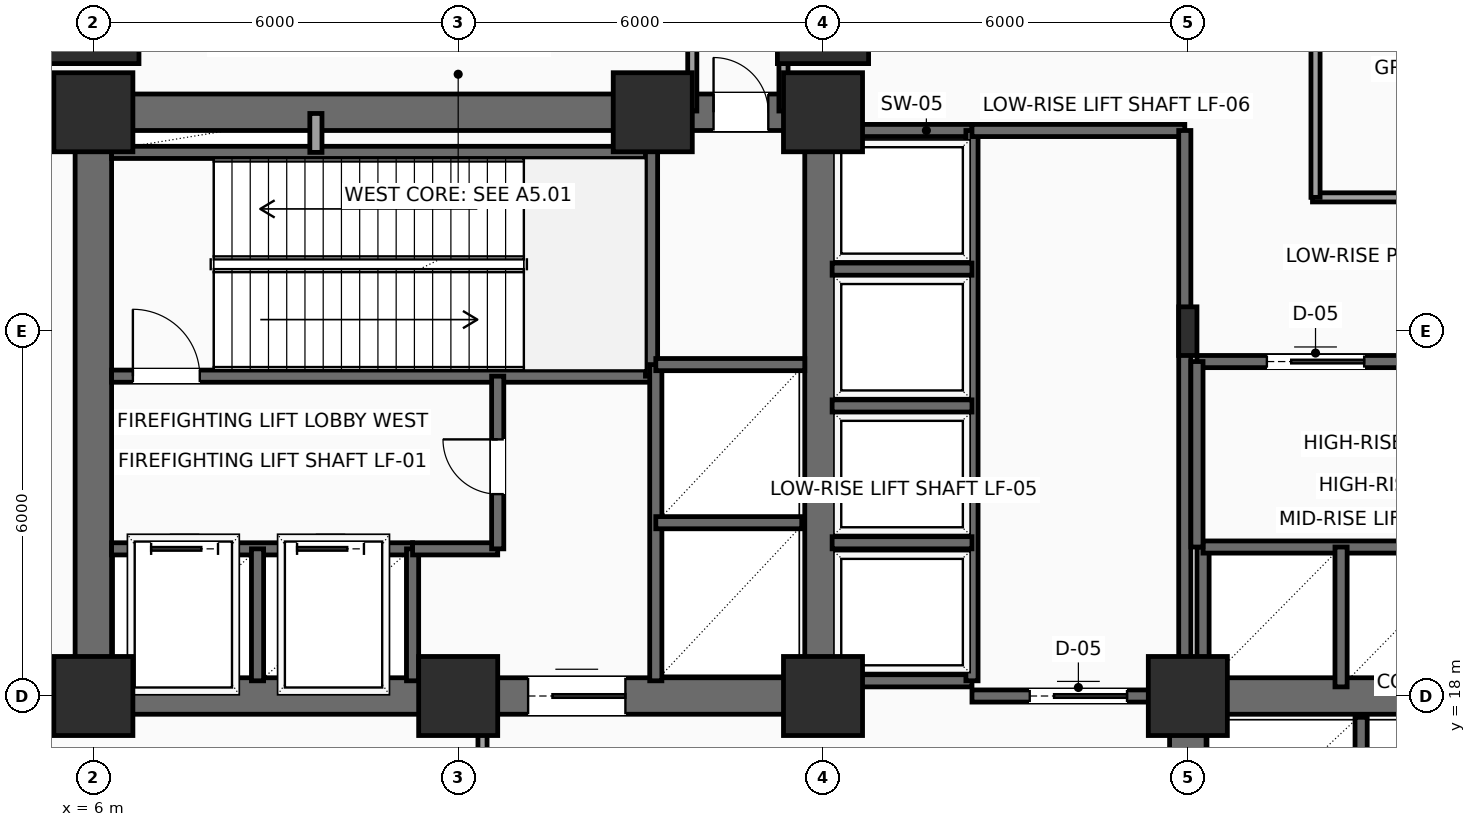
"""IFC4 building model, lengths in metres.
Left out: names, types, materials, properties, quantities, classifications, styles, units other than length and angle.
Written with IfcOpenShell. Run it as: python <this file> out.ifc"""

import sys

from ifc_helpers import new_model, si_unit, direction, frame, frame_2d, origin, origin_2d, place, context, subcontext, project, spatial, rectangle, i_section, extrude, element, fill, save


model = new_model("IFC4")
c1 = context("Model", 3, precision=1e-05, world=origin(), true_north=direction((0.0, 1.0)))
c2 = subcontext(c1, "Body", "Model", "MODEL_VIEW")
j1 = project(units=[si_unit("LENGTHUNIT", "METRE"), si_unit("PLANEANGLEUNIT", "RADIAN")], contexts=[c1])
p1 = place(None, origin())
s1 = spatial("IfcSite", under=j1, at=p1, CompositionType="ELEMENT")
p2 = place(p1, origin())
s2 = spatial("IfcBuilding", under=s1, at=p2, CompositionType="ELEMENT")
p3 = place(p2, frame((0.0, 0.0, 5.7)))
s3 = spatial("IfcBuildingStorey", under=s2, at=p3, CompositionType="ELEMENT", Elevation=5.7)
for number, where, z_axis, x_axis in (
    (1, (6.0, 18.0, 0.0), (0.0, 0.0, 1.0), (1.0, 0.0, 0.0)),
    (2, (12.0, 18.0, 0.0), (0.0, 0.0, 1.0), (1.0, 0.0, 0.0)),
    (3, (18.0, 18.0, 0.0), (0.0, 0.0, 1.0), (1.0, 0.0, 0.0)),
    (4, (6.0, 27.6, 0.0), (0.0, 0.0, 1.0), (1.0, 0.0, 0.0)),
    (5, (15.2, 27.6, 0.0), (0.0, 0.0, 1.0), (1.0, 0.0, 0.0)),
    (6, (18.0, 27.6, 0.0), (0.0, 0.0, 1.0), (1.0, 0.0, 0.0)),
    (7, (24.0, 18.0, 0.0), (0.0, 0.0, 1.0), (1.0, 0.0, 0.0)),
):
    element("IfcColumn", number, at=place(p3, frame(where, z_axis=z_axis, x_axis=x_axis)), inside=s3, PredefinedType="COLUMN", context=c2, shape_type="SweptSolid", body=[
        extrude(rectangle(XDim=1.3, YDim=1.3, at=origin_2d()), origin(), (0.0, 0.0, 1.0), 5.4),
    ])
for number, where, z_axis, x_axis in (
    (8, (6.0, 29.15, 0.0), (0.0, 0.0, 1.0), (1.0, 0.0, 0.0)),
    (9, (18.0, 29.15, 0.0), (0.0, 0.0, 1.0), (1.0, 0.0, 0.0)),
):
    element("IfcColumn", number, at=place(p3, frame(where, z_axis=z_axis, x_axis=x_axis)), inside=s3, PredefinedType="COLUMN", context=c2, shape_type="SweptSolid", body=[
        extrude(rectangle(XDim=1.5, YDim=1.5, at=origin_2d()), origin(), (0.0, 0.0, 1.0), 5.4),
    ])
p4 = place(p3, frame((24.0, 24.0, 0.0), z_axis=(0.0, 0.0, 1.0), x_axis=(1.0, 0.0, 0.0)))
e10 = element("IfcColumn", 10, at=p4, inside=s3, PredefinedType="COLUMN", context=c2, shape_type="SweptSolid", body=[
    extrude(i_section(OverallWidth=0.3, OverallDepth=0.8, WebThickness=0.018, FlangeThickness=0.033, FilletRadius=0.03, at=origin_2d()), origin(), (0.0, 0.0, 1.0), 5.4),
])
p5 = place(p3, frame((6.0, 18.0, 0.0), z_axis=(0.0, 0.0, 1.0), x_axis=(1.0, 0.0, 0.0)))
e11 = element("IfcWall", 11, at=p5, inside=s3, PredefinedType="SHEAR", context=c2, shape_type="SweptSolid", body=[
    extrude(rectangle(XDim=12.0, YDim=0.6, at=frame_2d((6.0, 0.0))), origin(), (0.0, 0.0, 1.0), 5.125),
])
p6 = place(p5, frame((7.15, 0.0, 0.0)))
e12 = element("IfcOpeningElement", 12, at=p6, cuts=e11, PredefinedType="OPENING", context=c2, shape_type="SweptSolid", body=[
    extrude(rectangle(XDim=1.6, YDim=2.3, at=frame_2d((0.8, 1.15))), frame((0.0, 0.31, 0.0), z_axis=(0.0, -1.0, 0.0), x_axis=(1.0, 0.0, 0.0)), (0.0, 0.0, 1.0), 0.62),
])
p7 = place(p3, frame((6.0, 27.6, 0.0), z_axis=(0.0, 0.0, 1.0), x_axis=(1.0, 0.0, 0.0)))
e13 = element("IfcWall", 13, at=p7, inside=s3, PredefinedType="SHEAR", context=c2, shape_type="SweptSolid", body=[
    extrude(rectangle(XDim=12.0, YDim=0.6, at=frame_2d((6.0, 0.0))), origin(), (0.0, 0.0, 1.0), 5.125),
])
p8 = place(p7, frame((10.2, 0.0, 0.0)))
e14 = element("IfcOpeningElement", 14, at=p8, cuts=e13, PredefinedType="OPENING", context=c2, shape_type="SweptSolid", body=[
    extrude(rectangle(XDim=0.9, YDim=2.15, at=frame_2d((0.45, 1.075))), frame((0.0, 0.31, 0.0), z_axis=(0.0, -1.0, 0.0), x_axis=(1.0, 0.0, 0.0)), (0.0, 0.0, 1.0), 0.62),
])
for number, where, z_axis, x_axis in (
    (15, (6.0, 18.0, 0.0), (0.0, 0.0, 1.0), (0.0, 1.0, 0.0)),
    (16, (18.0, 18.0, 0.0), (0.0, 0.0, 1.0), (0.0, 1.0, 0.0)),
    (17, (24.0, 18.0, 0.0), (0.0, 0.0, 1.0), (1.0, 0.0, 0.0)),
):
    element("IfcWall", number, at=place(p3, frame(where, z_axis=z_axis, x_axis=x_axis)), inside=s3, PredefinedType="SHEAR", context=c2, shape_type="SweptSolid", body=[
        extrude(rectangle(XDim=9.6, YDim=0.6, at=frame_2d((4.8, 0.0))), origin(), (0.0, 0.0, 1.0), 5.125),
    ])
p9 = place(p3, frame((24.0, 6.0, 0.0), z_axis=(0.0, 0.0, 1.0), x_axis=(0.0, 1.0, 0.0)))
e18 = element("IfcWall", 18, at=p9, inside=s3, PredefinedType="SHEAR", context=c2, shape_type="SweptSolid", body=[
    extrude(rectangle(XDim=12.0, YDim=0.6, at=frame_2d((6.0, 0.0))), origin(), (0.0, 0.0, 1.0), 5.125),
])
p10 = place(p9, frame((7.15, 0.0, 0.0)))
e19 = element("IfcOpeningElement", 19, at=p10, cuts=e18, PredefinedType="OPENING", context=c2, shape_type="SweptSolid", body=[
    extrude(rectangle(XDim=1.6, YDim=2.3, at=frame_2d((0.8, 1.15))), frame((0.0, 0.31, 0.0), z_axis=(0.0, -1.0, 0.0), x_axis=(1.0, 0.0, 0.0)), (0.0, 0.0, 1.0), 0.62),
])
p11 = place(p3, frame((6.3, 23.26, 0.0), z_axis=(0.0, 0.0, 1.0), x_axis=(1.0, 0.0, 0.0)))
e20 = element("IfcWall", 20, at=p11, inside=s3, PredefinedType="SHEAR", context=c2, shape_type="SweptSolid", body=[
    extrude(rectangle(XDim=8.88, YDim=0.2, at=frame_2d((4.44, 0.0))), origin(), (0.0, 0.0, 1.0), 5.125),
])
p12 = place(p11, frame((0.35, 0.0, 0.0)))
e21 = element("IfcOpeningElement", 21, at=p12, cuts=e20, PredefinedType="OPENING", context=c2, shape_type="SweptSolid", body=[
    extrude(rectangle(XDim=1.1, YDim=2.2, at=frame_2d((0.55, 1.1))), frame((0.0, 0.11, 0.0), z_axis=(0.0, -1.0, 0.0), x_axis=(1.0, 0.0, 0.0)), (0.0, 0.0, 1.0), 0.22),
])
p13 = place(p3, frame((6.3, 26.94, 0.0), z_axis=(0.0, 0.0, 1.0), x_axis=(1.0, 0.0, 0.0)))
e22 = element("IfcWall", 22, at=p13, inside=s3, PredefinedType="SHEAR", context=c2, shape_type="SweptSolid", body=[
    extrude(rectangle(XDim=8.88, YDim=0.2, at=frame_2d((4.44, 0.0))), origin(), (0.0, 0.0, 1.0), 5.125),
])
p14 = place(p3, frame((15.18, 23.26, 0.0), z_axis=(0.0, 0.0, 1.0), x_axis=(0.0, 1.0, 0.0)))
e23 = element("IfcWall", 23, at=p14, inside=s3, PredefinedType="SHEAR", context=c2, shape_type="SweptSolid", body=[
    extrude(rectangle(XDim=4.04, YDim=0.2, at=frame_2d((2.02, 0.0))), origin(), (0.0, 0.0, 1.0), 5.125),
])
p15 = place(p3, frame((6.3, 20.42, 0.0), z_axis=(0.0, 0.0, 1.0), x_axis=(1.0, 0.0, 0.0)))
e24 = element("IfcWall", 24, at=p15, inside=s3, PredefinedType="SHEAR", context=c2, shape_type="SweptSolid", body=[
    extrude(rectangle(XDim=4.95, YDim=0.2, at=frame_2d((2.475, 0.0))), origin(), (0.0, 0.0, 1.0), 5.125),
])
p16 = place(p15, frame((0.65, 0.0, 0.0)))
e25 = element("IfcOpeningElement", 25, at=p16, cuts=e24, PredefinedType="OPENING", context=c2, shape_type="SweptSolid", body=[
    extrude(rectangle(XDim=1.1, YDim=2.2, at=frame_2d((0.55, 1.1))), frame((0.0, 0.11, 0.0), z_axis=(0.0, -1.0, 0.0), x_axis=(1.0, 0.0, 0.0)), (0.0, 0.0, 1.0), 0.22),
])
p17 = place(p15, frame((3.05, 0.0, 0.0)))
e26 = element("IfcOpeningElement", 26, at=p17, cuts=e24, PredefinedType="OPENING", context=c2, shape_type="SweptSolid", body=[
    extrude(rectangle(XDim=1.1, YDim=2.2, at=frame_2d((0.55, 1.1))), frame((0.0, 0.11, 0.0), z_axis=(0.0, -1.0, 0.0), x_axis=(1.0, 0.0, 0.0)), (0.0, 0.0, 1.0), 0.22),
])
for number, where, z_axis, x_axis in (
    (27, (8.7, 18.25, 0.0), (0.0, 0.0, 1.0), (0.0, 1.0, 0.0)),
    (28, (11.25, 18.25, 0.0), (0.0, 0.0, 1.0), (0.0, 1.0, 0.0)),
):
    element("IfcWall", number, at=place(p3, frame(where, z_axis=z_axis, x_axis=x_axis)), inside=s3, PredefinedType="SHEAR", context=c2, shape_type="SweptSolid", body=[
        extrude(rectangle(XDim=2.17, YDim=0.2, at=frame_2d((1.085, 0.0))), origin(), (0.0, 0.0, 1.0), 5.125),
    ])
p18 = place(p3, frame((11.25, 20.42, 0.0), z_axis=(0.0, 0.0, 1.0), x_axis=(1.0, 0.0, 0.0)))
e29 = element("IfcWall", 29, at=p18, inside=s3, PredefinedType="SHEAR", context=c2, shape_type="SweptSolid", body=[
    extrude(rectangle(XDim=1.4, YDim=0.2, at=frame_2d((0.7, 0.0))), origin(), (0.0, 0.0, 1.0), 5.125),
])
p19 = place(p3, frame((12.65, 20.42, 0.0), z_axis=(0.0, 0.0, 1.0), x_axis=(0.0, 1.0, 0.0)))
e30 = element("IfcWall", 30, at=p19, inside=s3, PredefinedType="SHEAR", context=c2, shape_type="SweptSolid", body=[
    extrude(rectangle(XDim=2.84, YDim=0.2, at=frame_2d((1.42, 0.0))), origin(), (0.0, 0.0, 1.0), 5.125),
])
p20 = place(p19, frame((0.9, 0.0, 0.0)))
e31 = element("IfcOpeningElement", 31, at=p20, cuts=e30, PredefinedType="OPENING", context=c2, shape_type="SweptSolid", body=[
    extrude(rectangle(XDim=0.9, YDim=2.15, at=frame_2d((0.45, 1.075))), frame((0.0, 0.11, 0.0), z_axis=(0.0, -1.0, 0.0), x_axis=(1.0, 0.0, 0.0)), (0.0, 0.0, 1.0), 0.22),
])
p21 = place(p3, frame((9.66, 26.94, 0.0), z_axis=(0.0, 0.0, 1.0), x_axis=(0.0, 1.0, 0.0)))
e32 = element("IfcWall", 32, at=p21, inside=s3, PredefinedType="SOLIDWALL", context=c2, shape_type="SweptSolid", body=[
    extrude(rectangle(XDim=0.64, YDim=0.2, at=frame_2d((0.32, 0.0))), origin(), (0.0, 0.0, 1.0), 5.125),
])
p22 = place(p3, frame((15.25, 18.25, 0.0), z_axis=(0.0, 0.0, 1.0), x_axis=(0.0, 1.0, 0.0)))
e33 = element("IfcWall", 33, at=p22, inside=s3, PredefinedType="SHEAR", context=c2, shape_type="SweptSolid", body=[
    extrude(rectangle(XDim=5.2, YDim=0.2, at=frame_2d((2.6, 0.0))), origin(), (0.0, 0.0, 1.0), 5.125),
])
p23 = place(p3, frame((15.25, 20.85, 0.0), z_axis=(0.0, 0.0, 1.0), x_axis=(1.0, 0.0, 0.0)))
e34 = element("IfcWall", 34, at=p23, inside=s3, PredefinedType="SHEAR", context=c2, shape_type="SweptSolid", body=[
    extrude(rectangle(XDim=2.4, YDim=0.2, at=frame_2d((1.2, 0.0))), origin(), (0.0, 0.0, 1.0), 5.125),
])
p24 = place(p3, frame((15.25, 23.45, 0.0), z_axis=(0.0, 0.0, 1.0), x_axis=(1.0, 0.0, 0.0)))
e35 = element("IfcWall", 35, at=p24, inside=s3, PredefinedType="SHEAR", context=c2, shape_type="SweptSolid", body=[
    extrude(rectangle(XDim=2.45, YDim=0.2, at=frame_2d((1.225, 0.0))), origin(), (0.0, 0.0, 1.0), 5.125),
])
p25 = place(p3, frame((26.85, 15.25, 0.0), z_axis=(0.0, 0.0, 1.0), x_axis=(0.0, 1.0, 0.0)))
e36 = element("IfcWall", 36, at=p25, inside=s3, PredefinedType="SHEAR", context=c2, shape_type="SweptSolid", body=[
    extrude(rectangle(XDim=2.4, YDim=0.2, at=frame_2d((1.2, 0.0))), origin(), (0.0, 0.0, 1.0), 5.125),
])
for number, where, z_axis, x_axis in (
    (37, (18.1, 27.3, 0.0), (0.0, 0.0, 1.0), (1.0, 0.0, 0.0)),
    (38, (18.1, 18.25, 0.0), (0.0, 0.0, 1.0), (1.0, 0.0, 0.0)),
):
    element("IfcWall", number, at=place(p3, frame(where, z_axis=z_axis, x_axis=x_axis)), inside=s3, PredefinedType="SHEAR", context=c2, shape_type="SweptSolid", body=[
        extrude(rectangle(XDim=2.35, YDim=0.2, at=frame_2d((1.175, 0.0))), origin(), (0.0, 0.0, 1.0), 5.125),
    ])
p26 = place(p3, frame((20.45, 18.25, 0.0), z_axis=(0.0, 0.0, 1.0), x_axis=(0.0, 1.0, 0.0)))
e39 = element("IfcWall", 39, at=p26, inside=s3, PredefinedType="SHEAR", context=c2, shape_type="SweptSolid", body=[
    extrude(rectangle(XDim=9.05, YDim=0.2, at=frame_2d((4.525, 0.0))), origin(), (0.0, 0.0, 1.0), 5.125),
])
for number, where, z_axis, x_axis in (
    (40, (18.15, 20.52, 0.0), (0.0, 0.0, 1.0), (1.0, 0.0, 0.0)),
    (41, (18.15, 22.77, 0.0), (0.0, 0.0, 1.0), (1.0, 0.0, 0.0)),
    (42, (18.15, 25.02, 0.0), (0.0, 0.0, 1.0), (1.0, 0.0, 0.0)),
):
    element("IfcWall", number, at=place(p3, frame(where, z_axis=z_axis, x_axis=x_axis)), inside=s3, PredefinedType="SHEAR", context=c2, shape_type="SweptSolid", body=[
        extrude(rectangle(XDim=2.3, YDim=0.2, at=frame_2d((1.15, 0.0))), origin(), (0.0, 0.0, 1.0), 5.125),
    ])
p27 = place(p3, frame((20.45, 18.0, 0.0), z_axis=(0.0, 0.0, 1.0), x_axis=(1.0, 0.0, 0.0)))
e43 = element("IfcWall", 43, at=p27, inside=s3, PredefinedType="SHEAR", context=c2, shape_type="SweptSolid", body=[
    extrude(rectangle(XDim=3.5, YDim=0.2, at=frame_2d((1.75, 0.0))), origin(), (0.0, 0.0, 1.0), 5.125),
])
p28 = place(p27, frame((0.95, 0.0, 0.0)))
e44 = element("IfcOpeningElement", 44, at=p28, cuts=e43, PredefinedType="OPENING", context=c2, shape_type="SweptSolid", body=[
    extrude(rectangle(XDim=1.6, YDim=2.3, at=frame_2d((0.8, 1.15))), frame((0.0, 0.11, 0.0), z_axis=(0.0, -1.0, 0.0), x_axis=(1.0, 0.0, 0.0)), (0.0, 0.0, 1.0), 0.22),
])
p29 = place(p3, frame((20.45, 27.3, 0.0), z_axis=(0.0, 0.0, 1.0), x_axis=(1.0, 0.0, 0.0)))
e45 = element("IfcWall", 45, at=p29, inside=s3, PredefinedType="SHEAR", context=c2, shape_type="SweptSolid", body=[
    extrude(rectangle(XDim=3.5, YDim=0.2, at=frame_2d((1.75, 0.0))), origin(), (0.0, 0.0, 1.0), 5.125),
])
p30 = place(p3, frame((23.95, 18.0, 0.0), z_axis=(0.0, 0.0, 1.0), x_axis=(0.0, 1.0, 0.0)))
e46 = element("IfcWall", 46, at=p30, inside=s3, PredefinedType="SHEAR", context=c2, shape_type="SweptSolid", body=[
    extrude(rectangle(XDim=9.3, YDim=0.2, at=frame_2d((4.65, 0.0))), origin(), (0.0, 0.0, 1.0), 5.125),
])
p31 = place(p3, frame((24.25, 18.1, 0.0), z_axis=(0.0, 0.0, 1.0), x_axis=(0.0, 1.0, 0.0)))
e47 = element("IfcWall", 47, at=p31, inside=s3, PredefinedType="SHEAR", context=c2, shape_type="SweptSolid", body=[
    extrude(rectangle(XDim=2.35, YDim=0.2, at=frame_2d((1.175, 0.0))), origin(), (0.0, 0.0, 1.0), 5.125),
])
p32 = place(p3, frame((24.25, 20.45, 0.0), z_axis=(0.0, 0.0, 1.0), x_axis=(1.0, 0.0, 0.0)))
e48 = element("IfcWall", 48, at=p32, inside=s3, PredefinedType="SHEAR", context=c2, shape_type="SweptSolid", body=[
    extrude(rectangle(XDim=9.05, YDim=0.2, at=frame_2d((4.525, 0.0))), origin(), (0.0, 0.0, 1.0), 5.125),
])
p33 = place(p3, frame((26.52, 18.15, 0.0), z_axis=(0.0, 0.0, 1.0), x_axis=(0.0, 1.0, 0.0)))
e49 = element("IfcWall", 49, at=p33, inside=s3, PredefinedType="SHEAR", context=c2, shape_type="SweptSolid", body=[
    extrude(rectangle(XDim=2.3, YDim=0.2, at=frame_2d((1.15, 0.0))), origin(), (0.0, 0.0, 1.0), 5.125),
])
p34 = place(p3, frame((24.15, 23.5, 0.0), z_axis=(0.0, 0.0, 1.0), x_axis=(1.0, 0.0, 0.0)))
e50 = element("IfcWall", 50, at=p34, inside=s3, PredefinedType="SHEAR", context=c2, shape_type="SweptSolid", body=[
    extrude(rectangle(XDim=9.15, YDim=0.2, at=frame_2d((4.575, 0.0))), origin(), (0.0, 0.0, 1.0), 5.125),
])
p35 = place(p34, frame((1.15, 0.0, 0.0)))
e51 = element("IfcOpeningElement", 51, at=p35, cuts=e50, PredefinedType="OPENING", context=c2, shape_type="SweptSolid", body=[
    extrude(rectangle(XDim=1.6, YDim=2.3, at=frame_2d((0.8, 1.15))), frame((0.0, 0.11, 0.0), z_axis=(0.0, -1.0, 0.0), x_axis=(1.0, 0.0, 0.0)), (0.0, 0.0, 1.0), 0.22),
])
p36 = place(p3, frame((24.15, 20.45, 0.0), z_axis=(0.0, 0.0, 1.0), x_axis=(0.0, 1.0, 0.0)))
e52 = element("IfcWall", 52, at=p36, inside=s3, PredefinedType="SHEAR", context=c2, shape_type="SweptSolid", body=[
    extrude(rectangle(XDim=3.05, YDim=0.2, at=frame_2d((1.525, 0.0))), origin(), (0.0, 0.0, 1.0), 5.125),
])
p37 = place(p3, frame((12.4, 16.55, 0.0), z_axis=(0.0, 0.0, 1.0), x_axis=(0.0, 1.0, 0.0)))
e53 = element("IfcWall", 53, at=p37, inside=s3, PredefinedType="PARTITIONING", context=c2, shape_type="SweptSolid", body=[
    extrude(rectangle(XDim=1.41, YDim=0.15, at=frame_2d((0.705, 0.0))), origin(), (0.0, 0.0, 1.0), 5.125),
])
for number, where, z_axis, x_axis in (
    (54, (17.35, 30.2, 0.0), (0.0, 0.0, 1.0), (0.0, -1.0, 0.0)),
    (55, (15.85, 27.62, 0.0), (0.0, 0.0, 1.0), (0.0, 1.0, 0.0)),
):
    element("IfcWall", number, at=place(p3, frame(where, z_axis=z_axis, x_axis=x_axis)), inside=s3, PredefinedType="PARTITIONING", context=c2, shape_type="SweptSolid", body=[
        extrude(rectangle(XDim=2.58, YDim=0.15, at=frame_2d((1.29, 0.0))), origin(), (0.0, 0.0, 1.0), 5.125),
    ])
p38 = place(p3, frame((26.05, 26.2, 0.0), z_axis=(0.0, 0.0, 1.0), x_axis=(1.0, 0.0, 0.0)))
e56 = element("IfcWall", 56, at=p38, inside=s3, PredefinedType="PARTITIONING", context=c2, shape_type="SweptSolid", body=[
    extrude(rectangle(XDim=33.55, YDim=0.15, at=frame_2d((16.775, 0.0))), origin(), (0.0, 0.0, 1.0), 5.125),
])
p39 = place(p38, frame((2.45, 0.0, 0.0)))
e57 = element("IfcOpeningElement", 57, at=p39, cuts=e56, PredefinedType="OPENING", context=c2, shape_type="SweptSolid", body=[
    extrude(rectangle(XDim=0.9, YDim=2.1, at=frame_2d((0.45, 1.05))), frame((0.0, 0.085, 0.0), z_axis=(0.0, -1.0, 0.0), x_axis=(1.0, 0.0, 0.0)), (0.0, 0.0, 1.0), 0.17),
])
p40 = place(p38, frame((12.7, 0.0, 0.0)))
e58 = element("IfcOpeningElement", 58, at=p40, cuts=e56, PredefinedType="OPENING", context=c2, shape_type="SweptSolid", body=[
    extrude(rectangle(XDim=0.95, YDim=2.15, at=frame_2d((0.475, 1.075))), frame((0.0, 0.085, 0.0), z_axis=(0.0, -1.0, 0.0), x_axis=(1.0, 0.0, 0.0)), (0.0, 0.0, 1.0), 0.17),
])
p41 = place(p38, frame((22.275, 0.0, 0.0)))
e59 = element("IfcOpeningElement", 59, at=p41, cuts=e56, PredefinedType="OPENING", context=c2, shape_type="SweptSolid", body=[
    extrude(rectangle(XDim=0.95, YDim=2.15, at=frame_2d((0.475, 1.075))), frame((0.0, 0.085, 0.0), z_axis=(0.0, -1.0, 0.0), x_axis=(1.0, 0.0, 0.0)), (0.0, 0.0, 1.0), 0.17),
])
p42 = place(p38, frame((30.475, 0.0, 0.0)))
e60 = element("IfcOpeningElement", 60, at=p42, cuts=e56, PredefinedType="OPENING", context=c2, shape_type="SweptSolid", body=[
    extrude(rectangle(XDim=0.95, YDim=2.15, at=frame_2d((0.475, 1.075))), frame((0.0, 0.085, 0.0), z_axis=(0.0, -1.0, 0.0), x_axis=(1.0, 0.0, 0.0)), (0.0, 0.0, 1.0), 0.17),
])
p43 = place(p3, frame((26.1, 26.2, 0.0), z_axis=(0.0, 0.0, 1.0), x_axis=(0.0, 1.0, 0.0)))
e61 = element("IfcWall", 61, at=p43, inside=s3, PredefinedType="PARTITIONING", context=c2, shape_type="SweptSolid", body=[
    extrude(rectangle(XDim=3.45, YDim=0.15, at=frame_2d((1.725, 0.0))), origin(), (0.0, 0.0, 1.0), 5.125),
])
p44 = place(p6, origin())
e62 = element("IfcDoor", 62, at=p44, inside=s3, OperationType="DOUBLE_DOOR_SLIDING", PredefinedType="DOOR", context=c2, shape_type="SweptSolid", body=[
    extrude(rectangle(XDim=1.6, YDim=2.3, at=frame_2d((0.8, 1.15))), frame((0.0, 0.025, 0.0), z_axis=(0.0, -1.0, 0.0), x_axis=(1.0, 0.0, 0.0)), (0.0, 0.0, 1.0), 0.05),
])
fill(e12, e62)
p45 = place(p8, origin())
e63 = element("IfcDoor", 63, at=p45, inside=s3, OperationType="SINGLE_SWING_LEFT", PredefinedType="DOOR", context=c2, shape_type="SweptSolid", body=[
    extrude(rectangle(XDim=0.9, YDim=2.15, at=frame_2d((0.45, 1.075))), frame((0.0, 0.025, 0.0), z_axis=(0.0, -1.0, 0.0), x_axis=(1.0, 0.0, 0.0)), (0.0, 0.0, 1.0), 0.05),
])
fill(e14, e63)
p46 = place(p12, origin())
e64 = element("IfcDoor", 64, at=p46, inside=s3, OperationType="SINGLE_SWING_LEFT", PredefinedType="DOOR", context=c2, shape_type="SweptSolid", body=[
    extrude(rectangle(XDim=1.1, YDim=2.2, at=frame_2d((0.55, 1.1))), frame((0.0, 0.025, 0.0), z_axis=(0.0, -1.0, 0.0), x_axis=(1.0, 0.0, 0.0)), (0.0, 0.0, 1.0), 0.05),
])
fill(e21, e64)
p47 = place(p16, origin())
e65 = element("IfcDoor", 65, at=p47, inside=s3, OperationType="SLIDING_TO_LEFT", PredefinedType="DOOR", context=c2, shape_type="SweptSolid", body=[
    extrude(rectangle(XDim=1.1, YDim=2.2, at=frame_2d((0.55, 1.1))), frame((0.0, 0.025, 0.0), z_axis=(0.0, -1.0, 0.0), x_axis=(1.0, 0.0, 0.0)), (0.0, 0.0, 1.0), 0.05),
])
fill(e25, e65)
p48 = place(p17, origin())
e66 = element("IfcDoor", 66, at=p48, inside=s3, OperationType="SLIDING_TO_LEFT", PredefinedType="DOOR", context=c2, shape_type="SweptSolid", body=[
    extrude(rectangle(XDim=1.1, YDim=2.2, at=frame_2d((0.55, 1.1))), frame((0.0, 0.025, 0.0), z_axis=(0.0, -1.0, 0.0), x_axis=(1.0, 0.0, 0.0)), (0.0, 0.0, 1.0), 0.05),
])
fill(e26, e66)
p49 = place(p20, origin())
e67 = element("IfcDoor", 67, at=p49, inside=s3, OperationType="SINGLE_SWING_RIGHT", PredefinedType="DOOR", context=c2, shape_type="SweptSolid", body=[
    extrude(rectangle(XDim=0.9, YDim=2.15, at=frame_2d((0.45, 1.075))), frame((0.0, 0.025, 0.0), z_axis=(0.0, -1.0, 0.0), x_axis=(1.0, 0.0, 0.0)), (0.0, 0.0, 1.0), 0.05),
])
fill(e31, e67)
p50 = place(p28, origin())
e68 = element("IfcDoor", 68, at=p50, inside=s3, OperationType="DOUBLE_DOOR_SLIDING", PredefinedType="DOOR", context=c2, shape_type="SweptSolid", body=[
    extrude(rectangle(XDim=1.6, YDim=2.3, at=frame_2d((0.8, 1.15))), frame((0.0, 0.025, 0.0), z_axis=(0.0, -1.0, 0.0), x_axis=(1.0, 0.0, 0.0)), (0.0, 0.0, 1.0), 0.05),
])
fill(e44, e68)
p51 = place(p35, origin())
e69 = element("IfcDoor", 69, at=p51, inside=s3, OperationType="DOUBLE_DOOR_SLIDING", PredefinedType="DOOR", context=c2, shape_type="SweptSolid", body=[
    extrude(rectangle(XDim=1.6, YDim=2.3, at=frame_2d((0.8, 1.15))), frame((0.0, 0.025, 0.0), z_axis=(0.0, -1.0, 0.0), x_axis=(1.0, 0.0, 0.0)), (0.0, 0.0, 1.0), 0.05),
])
fill(e51, e69)
save(model, sys.argv[1])
